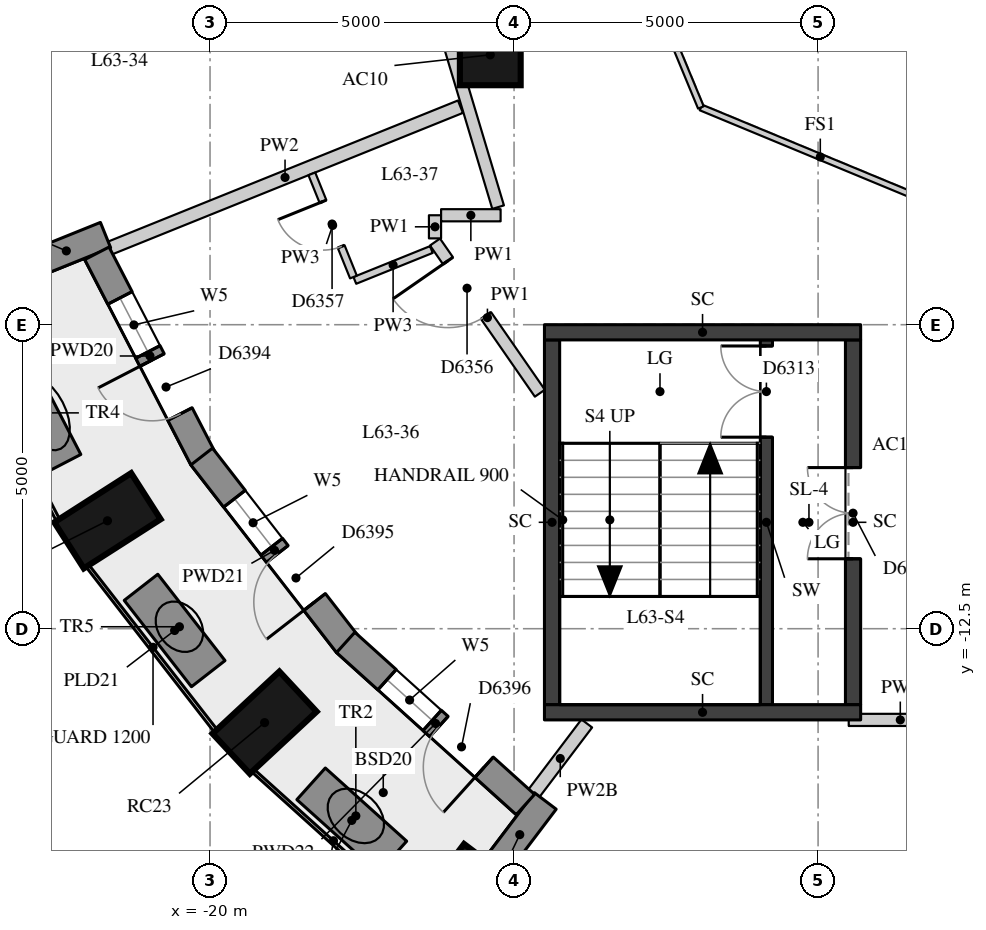
"""IFC4 building model, lengths in metres.
Left out: names, types, materials, properties, quantities, classifications, styles, units other than length and angle.
Written with IfcOpenShell. Run it as: python <this file> out.ifc"""

import sys

from ifc_helpers import new_model, si_unit, direction, frame, frame_2d, origin, origin_2d, place, context, subcontext, project, spatial, rectangle, extrude, element, fill, save


model = new_model("IFC4")
c1 = context("Model", 3, precision=1e-05, world=origin(), true_north=direction((0.0, 1.0)))
c2 = subcontext(c1, "Body", "Model", "MODEL_VIEW")
j1 = project(units=[si_unit("LENGTHUNIT", "METRE"), si_unit("PLANEANGLEUNIT", "RADIAN")], contexts=[c1])
p1 = place(None, origin())
s1 = spatial("IfcSite", under=j1, at=p1, CompositionType="ELEMENT")
p2 = place(p1, origin())
s2 = spatial("IfcBuilding", under=s1, at=p2, CompositionType="ELEMENT")
p3 = place(p2, frame((0.0, 0.0, 222.2)))
s3 = spatial("IfcBuildingStorey", under=s2, at=p3, CompositionType="ELEMENT", Elevation=222.2)
for number, where, z_axis, x_axis in (
    (1, (-21.687, -10.725, 0.0), (0.0, 0.0, 1.0), (-0.842, -0.539, 0.0)),
    (2, (-19.102, -14.045, 0.0), (0.0, 0.0, 1.0), (-0.732, -0.681, 0.0)),
    (3, (-15.916, -16.911, 0.0), (0.0, 0.0, 1.0), (-0.604, -0.797, 0.0)),
):
    element("IfcColumn", number, at=place(p3, frame(where, z_axis=z_axis, x_axis=x_axis)), inside=s3, PredefinedType="COLUMN", context=c2, shape_type="SweptSolid", body=[
        extrude(rectangle(XDim=1.5, YDim=0.9, at=origin_2d()), origin(), (0.0, 0.0, 1.0), 3.3),
    ])
p4 = place(p3, frame((-15.391, -3.062, 0.0), z_axis=(0.0, 0.0, 1.0), x_axis=(1.0, 0.0, 0.0)))
e4 = element("IfcColumn", 4, at=p4, inside=s3, PredefinedType="COLUMN", context=c2, shape_type="SweptSolid", body=[
    extrude(rectangle(XDim=1.0, YDim=1.0, at=origin_2d()), origin(), (0.0, 0.0, 1.0), 3.3),
])
p5 = place(p3, frame((-23.008, -6.546, 0.0), z_axis=(0.0, 0.0, 1.0), x_axis=(0.927346156366, 0.37420463155, 0.0)))
e5 = element("IfcWall", 5, at=p5, inside=s3, PredefinedType="SOLIDWALL", context=c2, shape_type="SweptSolid", body=[
    extrude(rectangle(XDim=1.39, YDim=0.45, at=frame_2d((0.695, 0.0))), origin(), (0.0, 0.0, 1.0), 3.02),
])
p6 = place(p3, frame((-15.326, -16.442, 0.0), z_axis=(0.0, 0.0, 1.0), x_axis=(0.603644757989, 0.797253414011, 0.0)))
e6 = element("IfcWall", 6, at=p6, inside=s3, PredefinedType="SOLIDWALL", context=c2, shape_type="SweptSolid", body=[
    extrude(rectangle(XDim=1.391, YDim=0.45, at=frame_2d((0.695, 0.0))), origin(), (0.0, 0.0, 1.0), 2.57),
])
p7 = place(p3, frame((-21.861, -6.326, 0.0), z_axis=(0.0, 0.0, 1.0), x_axis=(0.45924645187, -0.888308896975, 0.0)))
e7 = element("IfcWall", 7, at=p7, inside=s3, PredefinedType="SOLIDWALL", context=c2, shape_type="SweptSolid", body=[
    extrude(rectangle(XDim=3.802, YDim=0.45, at=frame_2d((1.901, 0.0))), origin(), (0.0, 0.0, 1.0), 3.02),
])
p8 = place(p7, frame((0.826, 0.0, 0.4)))
e8 = element("IfcOpeningElement", 8, at=p8, cuts=e7, PredefinedType="OPENING", context=c2, shape_type="SweptSolid", body=[
    extrude(rectangle(XDim=1.0, YDim=1.75, at=frame_2d((0.5, 0.875))), frame((0.0, 0.235, 0.0), z_axis=(0.0, -1.0, 0.0), x_axis=(1.0, 0.0, 0.0)), (0.0, 0.0, 1.0), 0.47),
])
p9 = place(p7, frame((1.976, 0.0, 0.0)))
e9 = element("IfcOpeningElement", 9, at=p9, cuts=e7, PredefinedType="OPENING", context=c2, shape_type="SweptSolid", body=[
    extrude(rectangle(XDim=1.0, YDim=2.15, at=frame_2d((0.5, 1.075))), frame((0.0, 0.235, 0.0), z_axis=(0.0, -1.0, 0.0), x_axis=(1.0, 0.0, 0.0)), (0.0, 0.0, 1.0), 0.47),
])
p10 = place(p3, frame((-20.137, -9.668, 0.0), z_axis=(0.0, 0.0, 1.0), x_axis=(0.613157177014, -0.789960933386, 0.0)))
e10 = element("IfcWall", 10, at=p10, inside=s3, PredefinedType="SOLIDWALL", context=c2, shape_type="SweptSolid", body=[
    extrude(rectangle(XDim=3.906, YDim=0.45, at=frame_2d((1.953, 0.0))), origin(), (0.0, 0.0, 1.0), 3.02),
])
p11 = place(p10, frame((0.878, 0.0, 0.4)))
e11 = element("IfcOpeningElement", 11, at=p11, cuts=e10, PredefinedType="OPENING", context=c2, shape_type="SweptSolid", body=[
    extrude(rectangle(XDim=1.0, YDim=1.75, at=frame_2d((0.5, 0.875))), frame((0.0, 0.235, 0.0), z_axis=(0.0, -1.0, 0.0), x_axis=(1.0, 0.0, 0.0)), (0.0, 0.0, 1.0), 0.47),
])
p12 = place(p10, frame((2.028, 0.0, 0.0)))
e12 = element("IfcOpeningElement", 12, at=p12, cuts=e10, PredefinedType="OPENING", context=c2, shape_type="SweptSolid", body=[
    extrude(rectangle(XDim=1.0, YDim=2.15, at=frame_2d((0.5, 1.075))), frame((0.0, 0.235, 0.0), z_axis=(0.0, -1.0, 0.0), x_axis=(1.0, 0.0, 0.0)), (0.0, 0.0, 1.0), 0.47),
])
p13 = place(p3, frame((-17.769, -12.725, 0.0), z_axis=(0.0, 0.0, 1.0), x_axis=(0.742485377568, -0.669862272484, 0.0)))
e13 = element("IfcWall", 13, at=p13, inside=s3, PredefinedType="SOLIDWALL", context=c2, shape_type="SweptSolid", body=[
    extrude(rectangle(XDim=3.98, YDim=0.45, at=frame_2d((1.99, 0.0))), origin(), (0.0, 0.0, 1.0), 3.02),
])
p14 = place(p13, frame((0.915, 0.0, 0.4)))
e14 = element("IfcOpeningElement", 14, at=p14, cuts=e13, PredefinedType="OPENING", context=c2, shape_type="SweptSolid", body=[
    extrude(rectangle(XDim=1.0, YDim=1.75, at=frame_2d((0.5, 0.875))), frame((0.0, 0.235, 0.0), z_axis=(0.0, -1.0, 0.0), x_axis=(1.0, 0.0, 0.0)), (0.0, 0.0, 1.0), 0.47),
])
p15 = place(p13, frame((2.065, 0.0, 0.0)))
e15 = element("IfcOpeningElement", 15, at=p15, cuts=e13, PredefinedType="OPENING", context=c2, shape_type="SweptSolid", body=[
    extrude(rectangle(XDim=1.0, YDim=2.15, at=frame_2d((0.5, 1.075))), frame((0.0, 0.235, 0.0), z_axis=(0.0, -1.0, 0.0), x_axis=(1.0, 0.0, 0.0)), (0.0, 0.0, 1.0), 0.47),
])
for number, where, z_axis, x_axis in (
    (16, (-23.264, -8.197, 0.0), (0.0, 0.0, 1.0), (0.46, -0.888, 0.0)),
    (17, (-21.135, -11.819, 0.0), (0.0, 0.0, 1.0), (0.614, -0.789, 0.0)),
    (18, (-18.338, -15.051, 0.0), (0.0, 0.0, 1.0), (0.743, -0.669, 0.0)),
):
    element("IfcWall", number, at=place(p3, frame(where, z_axis=z_axis, x_axis=x_axis)), inside=s3, PredefinedType="USERDEFINED", context=c2, shape_type="SweptSolid", body=[
        extrude(rectangle(XDim=1.8, YDim=0.7, at=frame_2d((0.9, 0.0))), origin(), (0.0, 0.0, 1.0), 0.75),
    ])
p16 = place(p3, frame((-10.85, -13.75, 0.0), z_axis=(0.0, 0.0, 1.0), x_axis=(0.0, 1.0, 0.0)))
e19 = element("IfcWall", 19, at=p16, inside=s3, PredefinedType="SHEAR", context=c2, shape_type="SweptSolid", body=[
    extrude(rectangle(XDim=6.0, YDim=0.2, at=frame_2d((3.0, 0.0))), origin(), (0.0, 0.0, 1.0), 3.02),
])
p17 = place(p16, frame((4.4, 0.0, 0.0)))
e20 = element("IfcOpeningElement", 20, at=p17, cuts=e19, PredefinedType="OPENING", context=c2, shape_type="SweptSolid", body=[
    extrude(rectangle(XDim=1.5, YDim=2.1, at=frame_2d((0.75, 1.05))), frame((0.0, 0.11, 0.0), z_axis=(0.0, -1.0, 0.0), x_axis=(1.0, 0.0, 0.0)), (0.0, 0.0, 1.0), 0.22),
])
p18 = place(p3, frame((-14.375, -13.75, -0.28), z_axis=(0.0, 0.0, 1.0), x_axis=(0.0, 1.0, 0.0)))
e21 = element("IfcWall", 21, at=p18, inside=s3, PredefinedType="SHEAR", context=c2, shape_type="SweptSolid", body=[
    extrude(rectangle(XDim=6.0, YDim=0.25, at=frame_2d((3.0, 0.0))), origin(), (0.0, 0.0, 1.0), 3.3),
])
p19 = place(p3, frame((-9.425, -13.75, -0.28), z_axis=(0.0, 0.0, 1.0), x_axis=(0.0, 1.0, 0.0)))
e22 = element("IfcWall", 22, at=p19, inside=s3, PredefinedType="SHEAR", context=c2, shape_type="SweptSolid", body=[
    extrude(rectangle(XDim=6.0, YDim=0.25, at=frame_2d((3.0, 0.0))), origin(), (0.0, 0.0, 1.0), 3.3),
])
p20 = place(p19, frame((2.4, 0.0, 0.28)))
e23 = element("IfcOpeningElement", 23, at=p20, cuts=e22, PredefinedType="OPENING", context=c2, shape_type="SweptSolid", body=[
    extrude(rectangle(XDim=1.5, YDim=2.1, at=frame_2d((0.75, 1.05))), frame((0.0, 0.135, 0.0), z_axis=(0.0, -1.0, 0.0), x_axis=(1.0, 0.0, 0.0)), (0.0, 0.0, 1.0), 0.27),
])
for number, where, z_axis, x_axis in (
    (24, (-14.5, -7.625, -0.28), (0.0, 0.0, 1.0), (1.0, 0.0, 0.0)),
    (25, (-14.5, -13.875, -0.28), (0.0, 0.0, 1.0), (1.0, 0.0, 0.0)),
):
    element("IfcWall", number, at=place(p3, frame(where, z_axis=z_axis, x_axis=x_axis)), inside=s3, PredefinedType="SHEAR", context=c2, shape_type="SweptSolid", body=[
        extrude(rectangle(XDim=5.2, YDim=0.25, at=frame_2d((2.6, 0.0))), origin(), (0.0, 0.0, 1.0), 3.3),
    ])
p21 = place(p3, frame((-7.8, -14.0, 0.0), z_axis=(0.0, 0.0, 1.0), x_axis=(-1.0, 0.0, 0.0)))
e26 = element("IfcWall", 26, at=p21, inside=s3, PredefinedType="PARTITIONING", context=c2, shape_type="SweptSolid", body=[
    extrude(rectangle(XDim=1.696, YDim=0.2, at=frame_2d((0.848, 0.0))), origin(), (0.0, 0.0, 1.0), 3.02),
])
p22 = place(p3, frame((-14.575, -8.627, 0.0), z_axis=(0.0, 0.0, 1.0), x_axis=(-0.569910381143, 0.821706856163, 0.0)))
e27 = element("IfcWall", 27, at=p22, inside=s3, PredefinedType="PARTITIONING", context=c2, shape_type="SweptSolid", body=[
    extrude(rectangle(XDim=3.026, YDim=0.2, at=frame_2d((1.513, 0.0))), origin(), (0.0, 0.0, 1.0), 3.02),
])
p23 = place(p22, frame((1.552, 0.0, 0.0)))
e28 = element("IfcOpeningElement", 28, at=p23, cuts=e27, PredefinedType="OPENING", context=c2, shape_type="SweptSolid", body=[
    extrude(rectangle(XDim=1.1, YDim=2.1, at=frame_2d((0.55, 1.05))), frame((0.0, 0.11, 0.0), z_axis=(0.0, -1.0, 0.0), x_axis=(1.0, 0.0, 0.0)), (0.0, 0.0, 1.0), 0.22),
])
p24 = place(p3, frame((-16.3, -6.08, 0.0), z_axis=(0.0, 0.0, 1.0), x_axis=(0.0, 1.0, 0.0)))
e29 = element("IfcWall", 29, at=p24, inside=s3, PredefinedType="PARTITIONING", context=c2, shape_type="SweptSolid", body=[
    extrude(rectangle(XDim=0.38, YDim=0.2, at=frame_2d((0.19, 0.0))), origin(), (0.0, 0.0, 1.0), 3.02),
])
p25 = place(p3, frame((-16.2, -5.7, 0.0), z_axis=(0.0, 0.0, 1.0), x_axis=(1.0, 0.0, 0.0)))
e30 = element("IfcWall", 30, at=p25, inside=s3, PredefinedType="PARTITIONING", context=c2, shape_type="SweptSolid", body=[
    extrude(rectangle(XDim=0.979, YDim=0.2, at=frame_2d((0.489, 0.0))), origin(), (0.0, 0.0, 1.0), 3.02),
])
p26 = place(p3, frame((-15.262, -5.567, 0.0), z_axis=(0.0, 0.0, 1.0), x_axis=(-0.28704593875, 0.957916817395, 0.0)))
e31 = element("IfcWall", 31, at=p26, inside=s3, PredefinedType="PARTITIONING", context=c2, shape_type="SweptSolid", body=[
    extrude(rectangle(XDim=6.751, YDim=0.2, at=frame_2d((3.375, 0.0))), origin(), (0.0, 0.0, 1.0), 3.02),
])
p27 = place(p26, frame((3.259, 0.0, 0.0)))
e32 = element("IfcOpeningElement", 32, at=p27, cuts=e31, PredefinedType="OPENING", context=c2, shape_type="SweptSolid", body=[
    extrude(rectangle(XDim=1.1, YDim=2.1, at=frame_2d((0.55, 1.05))), frame((0.0, 0.11, 0.0), z_axis=(0.0, -1.0, 0.0), x_axis=(1.0, 0.0, 0.0)), (0.0, 0.0, 1.0), 0.22),
])
p28 = place(p3, frame((-21.651, -6.241, 0.0), z_axis=(0.0, 0.0, 1.0), x_axis=(0.927390089179, 0.37409573974, 0.0)))
e33 = element("IfcWall", 33, at=p28, inside=s3, PredefinedType="PARTITIONING", context=c2, shape_type="SweptSolid", body=[
    extrude(rectangle(XDim=6.221, YDim=0.22, at=frame_2d((3.11, 0.0))), origin(), (0.0, 0.0, 1.0), 3.02),
])
p29 = place(p3, frame((-14.677, -15.211, 0.0), z_axis=(0.0, 0.0, 1.0), x_axis=(0.60355868562, 0.797318576864, 0.0)))
e34 = element("IfcWall", 34, at=p29, inside=s3, PredefinedType="PARTITIONING", context=c2, shape_type="SweptSolid", body=[
    extrude(rectangle(XDim=1.447, YDim=0.22, at=frame_2d((0.723, 0.0))), origin(), (0.0, 0.0, 1.0), 2.57),
])
p30 = place(p3, frame((-16.36, -6.264, 0.0), z_axis=(0.0, 0.0, 1.0), x_axis=(-0.927381089245, -0.374118049967, 0.0)))
e35 = element("IfcWall", 35, at=p30, inside=s3, PredefinedType="PARTITIONING", context=c2, shape_type="SweptSolid", body=[
    extrude(rectangle(XDim=1.357, YDim=0.12, at=frame_2d((0.679, 0.0))), origin(), (0.0, 0.0, 1.0), 3.02),
])
p31 = place(p3, frame((-17.641, -6.716, 0.0), z_axis=(0.0, 0.0, 1.0), x_axis=(-0.374103450988, 0.927386978536, 0.0)))
e36 = element("IfcWall", 36, at=p31, inside=s3, PredefinedType="PARTITIONING", context=c2, shape_type="SweptSolid", body=[
    extrude(rectangle(XDim=1.83, YDim=0.12, at=frame_2d((0.915, 0.0))), origin(), (0.0, 0.0, 1.0), 3.02),
])
p32 = place(p31, frame((0.54, 0.0, 0.0)))
e37 = element("IfcOpeningElement", 37, at=p32, cuts=e36, PredefinedType="OPENING", context=c2, shape_type="SweptSolid", body=[
    extrude(rectangle(XDim=0.8, YDim=2.1, at=frame_2d((0.4, 1.05))), frame((0.0, 0.07, 0.0), z_axis=(0.0, -1.0, 0.0), x_axis=(1.0, 0.0, 0.0)), (0.0, 0.0, 1.0), 0.14),
])
for number, where, z_axis, x_axis in (
    (38, (-8.0, -5.554, 0.0), (0.0, 0.0, 1.0), (-0.924, 0.383, 0.0)),
    (39, (-11.927, -3.927, 0.0), (0.0, 0.0, 1.0), (-0.383, 0.924, 0.0)),
):
    element("IfcWall", number, at=place(p3, frame(where, z_axis=z_axis, x_axis=x_axis)), inside=s3, PredefinedType="PARTITIONING", context=c2, shape_type="SweptSolid", body=[
        extrude(rectangle(XDim=4.251, YDim=0.1, at=frame_2d((2.125, 0.0))), origin(), (0.0, 0.0, 1.0), 3.02),
    ])
p33 = place(p8, origin())
e40 = element("IfcWindow", 40, at=p33, inside=s3, PartitioningType="SINGLE_PANEL", PredefinedType="WINDOW", context=c2, shape_type="SweptSolid", body=[
    extrude(rectangle(XDim=1.0, YDim=1.75, at=frame_2d((0.5, 0.875))), frame((0.0, 0.035, 0.0), z_axis=(0.0, -1.0, 0.0), x_axis=(1.0, 0.0, 0.0)), (0.0, 0.0, 1.0), 0.06),
])
fill(e8, e40)
p34 = place(p9, frame((1.0, 0.0, 0.0), z_axis=(0.0, 0.0, 1.0), x_axis=(-1.0, 0.0, 0.0)))
e41 = element("IfcDoor", 41, at=p34, inside=s3, OperationType="SINGLE_SWING_RIGHT", PredefinedType="DOOR", context=c2, shape_type="SweptSolid", body=[
    extrude(rectangle(XDim=1.0, YDim=2.15, at=frame_2d((0.5, 1.075))), frame((0.0, 0.075, 0.0), z_axis=(0.0, -1.0, 0.0), x_axis=(1.0, 0.0, 0.0)), (0.0, 0.0, 1.0), 0.05),
])
fill(e9, e41)
p35 = place(p11, origin())
e42 = element("IfcWindow", 42, at=p35, inside=s3, PartitioningType="SINGLE_PANEL", PredefinedType="WINDOW", context=c2, shape_type="SweptSolid", body=[
    extrude(rectangle(XDim=1.0, YDim=1.75, at=frame_2d((0.5, 0.875))), frame((0.0, 0.035, 0.0), z_axis=(0.0, -1.0, 0.0), x_axis=(1.0, 0.0, 0.0)), (0.0, 0.0, 1.0), 0.06),
])
fill(e11, e42)
p36 = place(p12, frame((1.0, 0.0, 0.0), z_axis=(0.0, 0.0, 1.0), x_axis=(-1.0, 0.0, 0.0)))
e43 = element("IfcDoor", 43, at=p36, inside=s3, OperationType="SINGLE_SWING_LEFT", PredefinedType="DOOR", context=c2, shape_type="SweptSolid", body=[
    extrude(rectangle(XDim=1.0, YDim=2.15, at=frame_2d((0.5, 1.075))), frame((0.0, 0.075, 0.0), z_axis=(0.0, -1.0, 0.0), x_axis=(1.0, 0.0, 0.0)), (0.0, 0.0, 1.0), 0.05),
])
fill(e12, e43)
p37 = place(p14, origin())
e44 = element("IfcWindow", 44, at=p37, inside=s3, PartitioningType="SINGLE_PANEL", PredefinedType="WINDOW", context=c2, shape_type="SweptSolid", body=[
    extrude(rectangle(XDim=1.0, YDim=1.75, at=frame_2d((0.5, 0.875))), frame((0.0, 0.035, 0.0), z_axis=(0.0, -1.0, 0.0), x_axis=(1.0, 0.0, 0.0)), (0.0, 0.0, 1.0), 0.06),
])
fill(e14, e44)
p38 = place(p15, frame((1.0, 0.0, 0.0), z_axis=(0.0, 0.0, 1.0), x_axis=(-1.0, 0.0, 0.0)))
e45 = element("IfcDoor", 45, at=p38, inside=s3, OperationType="SINGLE_SWING_LEFT", PredefinedType="DOOR", context=c2, shape_type="SweptSolid", body=[
    extrude(rectangle(XDim=1.0, YDim=2.15, at=frame_2d((0.5, 1.075))), frame((0.0, 0.075, 0.0), z_axis=(0.0, -1.0, 0.0), x_axis=(1.0, 0.0, 0.0)), (0.0, 0.0, 1.0), 0.05),
])
fill(e15, e45)
p39 = place(p17, origin())
e46 = element("IfcDoor", 46, at=p39, inside=s3, OperationType="DOUBLE_DOOR_SINGLE_SWING", PredefinedType="DOOR", context=c2, shape_type="SweptSolid", body=[
    extrude(rectangle(XDim=1.5, YDim=2.1, at=frame_2d((0.75, 1.05))), frame((0.0, 0.025, 0.0), z_axis=(0.0, -1.0, 0.0), x_axis=(1.0, 0.0, 0.0)), (0.0, 0.0, 1.0), 0.05),
])
fill(e20, e46)
p40 = place(p20, origin())
e47 = element("IfcDoor", 47, at=p40, inside=s3, OperationType="DOUBLE_DOOR_SINGLE_SWING", PredefinedType="DOOR", context=c2, shape_type="SweptSolid", body=[
    extrude(rectangle(XDim=1.5, YDim=2.1, at=frame_2d((0.75, 1.05))), frame((0.0, 0.025, 0.0), z_axis=(0.0, -1.0, 0.0), x_axis=(1.0, 0.0, 0.0)), (0.0, 0.0, 1.0), 0.05),
])
fill(e23, e47)
p41 = place(p23, origin())
e48 = element("IfcDoor", 48, at=p41, inside=s3, OperationType="SINGLE_SWING_RIGHT", PredefinedType="DOOR", context=c2, shape_type="SweptSolid", body=[
    extrude(rectangle(XDim=1.1, YDim=2.1, at=frame_2d((0.55, 1.05))), frame((0.0, 0.025, 0.0), z_axis=(0.0, -1.0, 0.0), x_axis=(1.0, 0.0, 0.0)), (0.0, 0.0, 1.0), 0.05),
])
fill(e28, e48)
p42 = place(p32, origin())
e49 = element("IfcDoor", 49, at=p42, inside=s3, OperationType="SINGLE_SWING_RIGHT", PredefinedType="DOOR", context=c2, shape_type="SweptSolid", body=[
    extrude(rectangle(XDim=0.8, YDim=2.1, at=frame_2d((0.4, 1.05))), frame((0.0, 0.025, 0.0), z_axis=(0.0, -1.0, 0.0), x_axis=(1.0, 0.0, 0.0)), (0.0, 0.0, 1.0), 0.05),
])
fill(e37, e49)
save(model, sys.argv[1])
